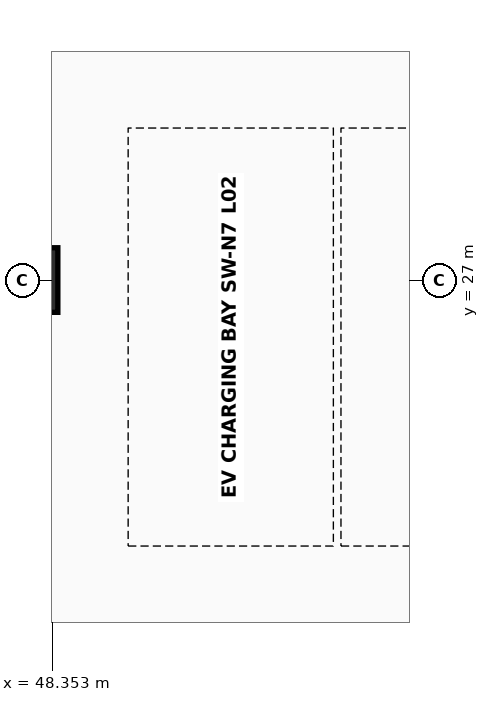
"""IFC4 building model, lengths in metres.
Left out: names, types, materials, properties, quantities, classifications, styles, units other than length and angle.
Written with IfcOpenShell. Run it as: python <this file> out.ifc"""

import sys

from ifc_helpers import new_model, si_unit, direction, frame, origin, origin_2d, place, context, subcontext, project, spatial, rectangle, extrude, element, save


model = new_model("IFC4")
c1 = context("Model", 3, precision=1e-05, world=origin(), true_north=direction((0.0, 1.0)))
c2 = subcontext(c1, "Body", "Model", "MODEL_VIEW")
j1 = project(units=[si_unit("LENGTHUNIT", "METRE"), si_unit("PLANEANGLEUNIT", "RADIAN")], contexts=[c1])
p1 = place(None, origin())
s1 = spatial("IfcSite", under=j1, at=p1, CompositionType="ELEMENT")
p2 = place(p1, origin())
s2 = spatial("IfcBuilding", under=s1, at=p2, CompositionType="ELEMENT")
p3 = place(p2, frame((0.0, 0.0, 9.6)))
s3 = spatial("IfcBuildingStorey", under=s2, at=p3, CompositionType="ELEMENT", Elevation=9.6)
p4 = place(p3, frame((48.0, 27.0, 0.0), z_axis=(0.0, 0.0, 1.0), x_axis=(1.0, 0.0, 0.0)))
e1 = element("IfcColumn", 1, at=p4, inside=s3, PredefinedType="COLUMN", context=c2, shape_type="SweptSolid", body=[
    extrude(rectangle(XDim=0.85, YDim=0.85, at=origin_2d()), origin(), (0.0, 0.0, 1.0), 3.8),
])
save(model, sys.argv[1])
